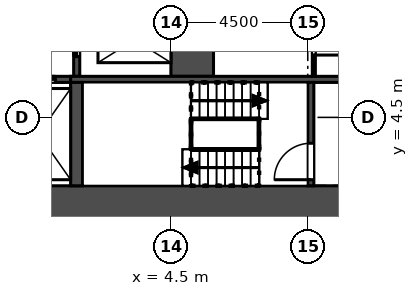
"""IFC4 building model, lengths in metres.
Left out: names, types, materials, properties, quantities, classifications, styles, units other than length and angle.
Written with IfcOpenShell. Run it as: python <this file> out.ifc"""

import sys

from ifc_helpers import new_model, si_unit, direction, frame, frame_2d, origin, place, context, subcontext, project, spatial, rectangle, extrude, element, fill, save


model = new_model("IFC4")
c1 = context("Model", 3, precision=1e-05, world=origin(), true_north=direction((0.0, 1.0)))
c2 = subcontext(c1, "Body", "Model", "MODEL_VIEW")
j1 = project(units=[si_unit("LENGTHUNIT", "METRE"), si_unit("PLANEANGLEUNIT", "RADIAN")], contexts=[c1])
p1 = place(None, origin())
s1 = spatial("IfcSite", under=j1, at=p1, CompositionType="ELEMENT")
p2 = place(p1, origin())
s2 = spatial("IfcBuilding", under=s1, at=p2, CompositionType="ELEMENT")
p3 = place(p2, frame((0.0, 0.0, 14.0)))
s3 = spatial("IfcBuildingStorey", under=s2, at=p3, CompositionType="ELEMENT", Elevation=14.0)
p4 = place(p3, frame((-14.0, 1.55, 0.0), z_axis=(0.0, 0.0, 1.0), x_axis=(1.0, 0.0, 0.0)))
e1 = element("IfcWall", 1, at=p4, inside=s3, PredefinedType="SHEAR", context=c2, shape_type="SweptSolid", body=[
    extrude(rectangle(XDim=28.0, YDim=1.4, at=frame_2d((14.0, 0.0))), origin(), (0.0, 0.0, 1.0), 6.0),
])
p5 = place(p3, frame((1.4, 5.85, -0.3), z_axis=(0.0, 0.0, 1.0), x_axis=(0.0, 1.0, 0.0)))
e2 = element("IfcWall", 2, at=p5, inside=s3, PredefinedType="SOLIDWALL", context=c2, shape_type="SweptSolid", body=[
    extrude(rectangle(XDim=11.75, YDim=0.2, at=frame_2d((5.875, 0.0))), origin(), (0.0, 0.0, 1.0), 6.0),
])
p6 = place(p5, frame((0.65, 0.0, 0.3)))
e3 = element("IfcOpeningElement", 3, at=p6, cuts=e2, PredefinedType="OPENING", context=c2, shape_type="SweptSolid", body=[
    extrude(rectangle(XDim=1.1, YDim=2.1, at=frame_2d((0.55, 1.05))), frame((0.0, 0.11, 0.0), z_axis=(0.0, -1.0, 0.0), x_axis=(1.0, 0.0, 0.0)), (0.0, 0.0, 1.0), 0.22),
])
p7 = place(p5, frame((3.3, 0.0, 0.3)))
e4 = element("IfcOpeningElement", 4, at=p7, cuts=e2, PredefinedType="OPENING", context=c2, shape_type="SweptSolid", body=[
    extrude(rectangle(XDim=1.0, YDim=2.1, at=frame_2d((0.5, 1.05))), frame((0.0, 0.11, 0.0), z_axis=(0.0, -1.0, 0.0), x_axis=(1.0, 0.0, 0.0)), (0.0, 0.0, 1.0), 0.22),
])
p8 = place(p3, frame((5.2, 5.85, -0.3), z_axis=(0.0, 0.0, 1.0), x_axis=(0.0, 1.0, 0.0)))
e5 = element("IfcWall", 5, at=p8, inside=s3, PredefinedType="SOLIDWALL", context=c2, shape_type="SweptSolid", body=[
    extrude(rectangle(XDim=2.4, YDim=1.4, at=frame_2d((1.2, 0.0))), origin(), (0.0, 0.0, 1.0), 6.0),
])
p9 = place(p3, frame((-1.2, 5.75, -0.3), z_axis=(0.0, 0.0, 1.0), x_axis=(1.0, 0.0, 0.0)))
e6 = element("IfcWall", 6, at=p9, inside=s3, PredefinedType="SOLIDWALL", context=c2, shape_type="SweptSolid", body=[
    extrude(rectangle(XDim=2.4, YDim=0.2, at=frame_2d((1.2, 0.0))), origin(), (0.0, 0.0, 1.0), 6.0),
])
p10 = place(p9, frame((0.5, 0.0, 0.3)))
e7 = element("IfcOpeningElement", 7, at=p10, cuts=e6, PredefinedType="OPENING", context=c2, shape_type="SweptSolid", body=[
    extrude(rectangle(XDim=1.4, YDim=2.1, at=frame_2d((0.7, 1.05))), frame((0.0, 0.11, 0.0), z_axis=(0.0, -1.0, 0.0), x_axis=(1.0, 0.0, 0.0)), (0.0, 0.0, 1.0), 0.22),
])
p11 = place(p3, frame((1.2, 5.75, -0.3), z_axis=(0.0, 0.0, 1.0), x_axis=(1.0, 0.0, 0.0)))
e8 = element("IfcWall", 8, at=p11, inside=s3, PredefinedType="SOLIDWALL", context=c2, shape_type="SweptSolid", body=[
    extrude(rectangle(XDim=11.4, YDim=0.2, at=frame_2d((5.7, 0.0))), origin(), (0.0, 0.0, 1.0), 6.0),
])
p12 = place(p3, frame((9.1, 2.25, -0.3), z_axis=(0.0, 0.0, 1.0), x_axis=(0.0, 1.0, 0.0)))
e9 = element("IfcWall", 9, at=p12, inside=s3, PredefinedType="SOLIDWALL", context=c2, shape_type="SweptSolid", body=[
    extrude(rectangle(XDim=3.4, YDim=0.2, at=frame_2d((1.7, 0.0))), origin(), (0.0, 0.0, 1.0), 6.0),
])
p13 = place(p12, frame((0.2, 0.0, 0.3)))
e10 = element("IfcOpeningElement", 10, at=p13, cuts=e9, PredefinedType="OPENING", context=c2, shape_type="SweptSolid", body=[
    extrude(rectangle(XDim=1.2, YDim=2.1, at=frame_2d((0.6, 1.05))), frame((0.0, 0.11, 0.0), z_axis=(0.0, -1.0, 0.0), x_axis=(1.0, 0.0, 0.0)), (0.0, 0.0, 1.0), 0.22),
])
p14 = place(p3, frame((1.4, 2.25, -0.3), z_axis=(0.0, 0.0, 1.0), x_axis=(0.0, 1.0, 0.0)))
e11 = element("IfcWall", 11, at=p14, inside=s3, PredefinedType="SOLIDWALL", context=c2, shape_type="SweptSolid", body=[
    extrude(rectangle(XDim=3.4, YDim=0.4, at=frame_2d((1.7, 0.0))), origin(), (0.0, 0.0, 1.0), 6.0),
])
p15 = place(p3, frame((9.2, 5.85, 0.0), z_axis=(0.0, 0.0, 1.0), x_axis=(0.0, 1.0, 0.0)))
e12 = element("IfcWall", 12, at=p15, inside=s3, PredefinedType="PARTITIONING", context=c2, shape_type="SweptSolid", body=[
    extrude(rectangle(XDim=2.4, YDim=0.1, at=frame_2d((1.2, 0.0))), origin(), (0.0, 0.0, 1.0), 5.7),
])
p16 = place(p15, frame((0.7, 0.0, 0.0)))
e13 = element("IfcOpeningElement", 13, at=p16, cuts=e12, PredefinedType="OPENING", context=c2, shape_type="SweptSolid", body=[
    extrude(rectangle(XDim=0.9, YDim=2.1, at=frame_2d((0.45, 1.05))), frame((0.0, 0.06, 0.0), z_axis=(0.0, -1.0, 0.0), x_axis=(1.0, 0.0, 0.0)), (0.0, 0.0, 1.0), 0.12),
])
p17 = place(p6, origin())
e14 = element("IfcDoor", 14, at=p17, inside=s3, OperationType="SLIDING_TO_RIGHT", PredefinedType="DOOR", context=c2, shape_type="SweptSolid", body=[
    extrude(rectangle(XDim=1.1, YDim=2.1, at=frame_2d((0.55, 1.05))), frame((0.0, 0.025, 0.0), z_axis=(0.0, -1.0, 0.0), x_axis=(1.0, 0.0, 0.0)), (0.0, 0.0, 1.0), 0.05),
])
fill(e3, e14)
p18 = place(p10, origin())
e15 = element("IfcDoor", 15, at=p18, inside=s3, OperationType="SLIDING_TO_LEFT", PredefinedType="DOOR", context=c2, shape_type="SweptSolid", body=[
    extrude(rectangle(XDim=1.4, YDim=2.1, at=frame_2d((0.7, 1.05))), frame((0.0, 0.025, 0.0), z_axis=(0.0, -1.0, 0.0), x_axis=(1.0, 0.0, 0.0)), (0.0, 0.0, 1.0), 0.05),
])
fill(e7, e15)
p19 = place(p16, frame((0.9, 0.0, 0.0), z_axis=(0.0, 0.0, 1.0), x_axis=(-1.0, 0.0, 0.0)))
e16 = element("IfcDoor", 16, at=p19, inside=s3, OperationType="SINGLE_SWING_RIGHT", PredefinedType="DOOR", context=c2, shape_type="SweptSolid", body=[
    extrude(rectangle(XDim=0.9, YDim=2.1, at=frame_2d((0.45, 1.05))), frame((0.0, 0.025, 0.0), z_axis=(0.0, -1.0, 0.0), x_axis=(1.0, 0.0, 0.0)), (0.0, 0.0, 1.0), 0.05),
])
fill(e13, e16)
p20 = place(p13, origin())
e17 = element("IfcDoor", 17, at=p20, inside=s3, OperationType="SINGLE_SWING_LEFT", PredefinedType="DOOR", context=c2, shape_type="SweptSolid", body=[
    extrude(rectangle(XDim=1.2, YDim=2.1, at=frame_2d((0.6, 1.05))), frame((0.0, 0.025, 0.0), z_axis=(0.0, -1.0, 0.0), x_axis=(1.0, 0.0, 0.0)), (0.0, 0.0, 1.0), 0.05),
])
fill(e10, e17)
save(model, sys.argv[1])
